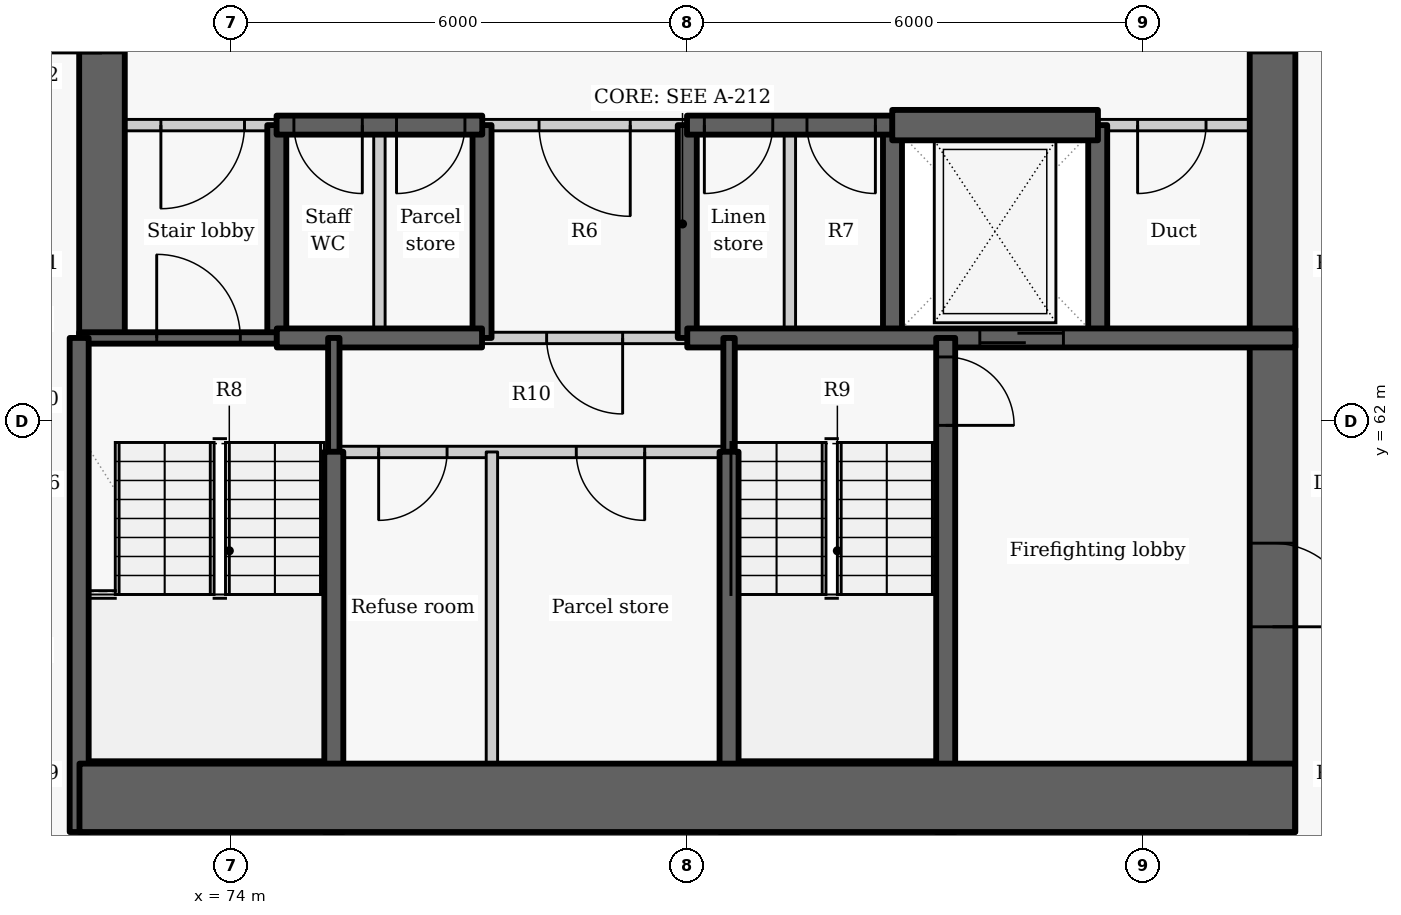
"""IFC4 building model, lengths in metres.
Left out: names, types, materials, properties, quantities, classifications, styles, units other than length and angle.
Written with IfcOpenShell. Run it as: python <this file> out.ifc"""

import sys

from ifc_helpers import new_model, si_unit, direction, frame, frame_2d, origin, place, context, subcontext, project, spatial, rectangle, extrude, element, fill, save


model = new_model("IFC4")
c1 = context("Model", 3, precision=1e-05, world=origin(), true_north=direction((0.0, 1.0)))
c2 = subcontext(c1, "Body", "Model", "MODEL_VIEW")
j1 = project(units=[si_unit("LENGTHUNIT", "METRE"), si_unit("PLANEANGLEUNIT", "RADIAN")], contexts=[c1])
p1 = place(None, origin())
s1 = spatial("IfcSite", under=j1, at=p1, CompositionType="ELEMENT")
p2 = place(p1, origin())
s2 = spatial("IfcBuilding", under=s1, at=p2, CompositionType="ELEMENT")
p3 = place(p2, frame((0.0, 0.0, 51.3)))
s3 = spatial("IfcBuildingStorey", under=s2, at=p3, CompositionType="ELEMENT", Elevation=51.3)
p4 = place(p3, frame((74.6, 63.1, -0.275), z_axis=(0.0, 0.0, 1.0), x_axis=(0.0, 1.0, 0.0)))
e1 = element("IfcWall", 1, at=p4, inside=s3, PredefinedType="SHEAR", context=c2, shape_type="SweptSolid", body=[
    extrude(rectangle(XDim=2.8, YDim=0.25, at=frame_2d((1.4, 0.0))), origin(), (0.0, 0.0, 1.0), 3.3),
])
p5 = place(p3, frame((72.3, 63.1, -0.275), z_axis=(0.0, 0.0, 1.0), x_axis=(0.0, 1.0, 0.0)))
e2 = element("IfcWall", 2, at=p5, inside=s3, PredefinedType="SHEAR", context=c2, shape_type="SweptSolid", body=[
    extrude(rectangle(XDim=9.1, YDim=0.6, at=frame_2d((4.55, 0.0))), origin(), (0.0, 0.0, 1.0), 3.3),
])
p6 = place(p5, frame((3.75, 0.0, 0.275)))
e3 = element("IfcOpeningElement", 3, at=p6, cuts=e2, PredefinedType="OPENING", context=c2, shape_type="SweptSolid", body=[
    extrude(rectangle(XDim=1.5, YDim=2.1, at=frame_2d((0.75, 1.05))), frame((0.0, 0.31, 0.0), z_axis=(0.0, -1.0, 0.0), x_axis=(1.0, 0.0, 0.0)), (0.0, 0.0, 1.0), 0.62),
])
for number, where, z_axis, x_axis in (
    (4, (77.3, 63.1, -0.275), (0.0, 0.0, 1.0), (0.0, 1.0, 0.0)),
    (5, (80.0, 63.1, -0.275), (0.0, 0.0, 1.0), (0.0, 1.0, 0.0)),
    (6, (82.7, 63.1, -0.275), (0.0, 0.0, 1.0), (0.0, 1.0, 0.0)),
    (7, (85.4, 63.1, -0.275), (0.0, 0.0, 1.0), (0.0, 1.0, 0.0)),
):
    element("IfcWall", number, at=place(p3, frame(where, z_axis=z_axis, x_axis=x_axis)), inside=s3, PredefinedType="SHEAR", context=c2, shape_type="SweptSolid", body=[
        extrude(rectangle(XDim=2.8, YDim=0.25, at=frame_2d((1.4, 0.0))), origin(), (0.0, 0.0, 1.0), 3.3),
    ])
p7 = place(p3, frame((87.7, 72.2, -0.275), z_axis=(0.0, 0.0, 1.0), x_axis=(0.0, -1.0, 0.0)))
e8 = element("IfcWall", 8, at=p7, inside=s3, PredefinedType="SHEAR", context=c2, shape_type="SweptSolid", body=[
    extrude(rectangle(XDim=15.6, YDim=0.6, at=frame_2d((7.8, 0.0))), origin(), (0.0, 0.0, 1.0), 3.3),
])
p8 = place(p7, frame((3.85, 0.0, 0.275)))
e9 = element("IfcOpeningElement", 9, at=p8, cuts=e8, PredefinedType="OPENING", context=c2, shape_type="SweptSolid", body=[
    extrude(rectangle(XDim=1.5, YDim=2.1, at=frame_2d((0.75, 1.05))), frame((0.0, 0.31, 0.0), z_axis=(0.0, -1.0, 0.0), x_axis=(1.0, 0.0, 0.0)), (0.0, 0.0, 1.0), 0.62),
])
p9 = place(p7, frame((11.8, 0.0, 0.275)))
e10 = element("IfcOpeningElement", 10, at=p9, cuts=e8, PredefinedType="OPENING", context=c2, shape_type="SweptSolid", body=[
    extrude(rectangle(XDim=1.1, YDim=2.1, at=frame_2d((0.55, 1.05))), frame((0.0, 0.31, 0.0), z_axis=(0.0, -1.0, 0.0), x_axis=(1.0, 0.0, 0.0)), (0.0, 0.0, 1.0), 0.62),
])
p10 = place(p3, frame((74.603, 65.9, 0.0), z_axis=(0.0, 0.0, 1.0), x_axis=(-1.0, 0.0, 0.0)))
e11 = element("IfcWall", 11, at=p10, inside=s3, PredefinedType="PARTITIONING", context=c2, shape_type="SweptSolid", body=[
    extrude(rectangle(XDim=2.603, YDim=0.15, at=frame_2d((1.302, 0.0))), origin(), (0.0, 0.0, 1.0), 3.025),
])
p11 = place(p10, frame((0.428, 0.0, 0.0)))
e12 = element("IfcOpeningElement", 12, at=p11, cuts=e11, PredefinedType="OPENING", context=c2, shape_type="SweptSolid", body=[
    extrude(rectangle(XDim=1.1, YDim=2.1, at=frame_2d((0.55, 1.05))), frame((0.0, 0.085, 0.0), z_axis=(0.0, -1.0, 0.0), x_axis=(1.0, 0.0, 0.0)), (0.0, 0.0, 1.0), 0.17),
])
p12 = place(p3, frame((80.003, 65.9, 0.0), z_axis=(0.0, 0.0, 1.0), x_axis=(-1.0, 0.0, 0.0)))
e13 = element("IfcWall", 13, at=p12, inside=s3, PredefinedType="PARTITIONING", context=c2, shape_type="SweptSolid", body=[
    extrude(rectangle(XDim=2.706, YDim=0.15, at=frame_2d((1.353, 0.0))), origin(), (0.0, 0.0, 1.0), 3.025),
])
p13 = place(p12, frame((0.753, 0.0, 0.0)))
e14 = element("IfcOpeningElement", 14, at=p13, cuts=e13, PredefinedType="OPENING", context=c2, shape_type="SweptSolid", body=[
    extrude(rectangle(XDim=1.2, YDim=2.1, at=frame_2d((0.6, 1.05))), frame((0.0, 0.085, 0.0), z_axis=(0.0, -1.0, 0.0), x_axis=(1.0, 0.0, 0.0)), (0.0, 0.0, 1.0), 0.17),
])
p14 = place(p3, frame((88.0, 65.9, 0.0), z_axis=(0.0, 0.0, 1.0), x_axis=(-1.0, 0.0, 0.0)))
e15 = element("IfcWall", 15, at=p14, inside=s3, PredefinedType="PARTITIONING", context=c2, shape_type="SweptSolid", body=[
    extrude(rectangle(XDim=2.603, YDim=0.15, at=frame_2d((1.302, 0.0))), origin(), (0.0, 0.0, 1.0), 3.025),
])
p15 = place(p14, frame((1.175, 0.0, 0.0)))
e16 = element("IfcOpeningElement", 16, at=p15, cuts=e15, PredefinedType="OPENING", context=c2, shape_type="SweptSolid", body=[
    extrude(rectangle(XDim=0.9, YDim=2.1, at=frame_2d((0.45, 1.05))), frame((0.0, 0.085, 0.0), z_axis=(0.0, -1.0, 0.0), x_axis=(1.0, 0.0, 0.0)), (0.0, 0.0, 1.0), 0.17),
])
p16 = place(p3, frame((77.303, 65.9, -0.275), z_axis=(0.0, 0.0, 1.0), x_axis=(-1.0, 0.0, 0.0)))
e17 = element("IfcWall", 17, at=p16, inside=s3, PredefinedType="SHEAR", context=c2, shape_type="SweptSolid", body=[
    extrude(rectangle(XDim=2.706, YDim=0.25, at=frame_2d((1.353, 0.0))), origin(), (0.0, 0.0, 1.0), 3.3),
])
p17 = place(p16, frame((1.578, 0.0, 0.275)))
e18 = element("IfcOpeningElement", 18, at=p17, cuts=e17, PredefinedType="OPENING", context=c2, shape_type="SweptSolid", body=[
    extrude(rectangle(XDim=0.9, YDim=2.1, at=frame_2d((0.45, 1.05))), frame((0.0, 0.135, 0.0), z_axis=(0.0, -1.0, 0.0), x_axis=(1.0, 0.0, 0.0)), (0.0, 0.0, 1.0), 0.27),
])
p18 = place(p16, frame((0.228, 0.0, 0.275)))
e19 = element("IfcOpeningElement", 19, at=p18, cuts=e17, PredefinedType="OPENING", context=c2, shape_type="SweptSolid", body=[
    extrude(rectangle(XDim=0.9, YDim=2.1, at=frame_2d((0.45, 1.05))), frame((0.0, 0.135, 0.0), z_axis=(0.0, -1.0, 0.0), x_axis=(1.0, 0.0, 0.0)), (0.0, 0.0, 1.0), 0.27),
])
p19 = place(p3, frame((82.703, 65.9, -0.275), z_axis=(0.0, 0.0, 1.0), x_axis=(-1.0, 0.0, 0.0)))
e20 = element("IfcWall", 20, at=p19, inside=s3, PredefinedType="SHEAR", context=c2, shape_type="SweptSolid", body=[
    extrude(rectangle(XDim=2.706, YDim=0.25, at=frame_2d((1.353, 0.0))), origin(), (0.0, 0.0, 1.0), 3.3),
])
p20 = place(p19, frame((1.578, 0.0, 0.275)))
e21 = element("IfcOpeningElement", 21, at=p20, cuts=e20, PredefinedType="OPENING", context=c2, shape_type="SweptSolid", body=[
    extrude(rectangle(XDim=0.9, YDim=2.1, at=frame_2d((0.45, 1.05))), frame((0.0, 0.135, 0.0), z_axis=(0.0, -1.0, 0.0), x_axis=(1.0, 0.0, 0.0)), (0.0, 0.0, 1.0), 0.27),
])
p21 = place(p19, frame((0.228, 0.0, 0.275)))
e22 = element("IfcOpeningElement", 22, at=p21, cuts=e20, PredefinedType="OPENING", context=c2, shape_type="SweptSolid", body=[
    extrude(rectangle(XDim=0.9, YDim=2.1, at=frame_2d((0.45, 1.05))), frame((0.0, 0.135, 0.0), z_axis=(0.0, -1.0, 0.0), x_axis=(1.0, 0.0, 0.0)), (0.0, 0.0, 1.0), 0.27),
])
p22 = place(p3, frame((82.697, 65.9, -0.275), z_axis=(0.0, 0.0, 1.0), x_axis=(1.0, 0.0, 0.0)))
e23 = element("IfcWall", 23, at=p22, inside=s3, PredefinedType="SHEAR", context=c2, shape_type="SweptSolid", body=[
    extrude(rectangle(XDim=2.706, YDim=0.4, at=frame_2d((1.353, 0.0))), origin(), (0.0, 0.0, 1.0), 3.3),
])
p23 = place(p3, frame((72.0, 63.1, -0.275), z_axis=(0.0, 0.0, 1.0), x_axis=(1.0, 0.0, 0.0)))
e24 = element("IfcWall", 24, at=p23, inside=s3, PredefinedType="SHEAR", context=c2, shape_type="SweptSolid", body=[
    extrude(rectangle(XDim=2.6, YDim=0.15, at=frame_2d((1.3, 0.0))), origin(), (0.0, 0.0, 1.0), 3.3),
])
p24 = place(p23, frame((1.02, 0.0, 0.275)))
e25 = element("IfcOpeningElement", 25, at=p24, cuts=e24, PredefinedType="OPENING", context=c2, shape_type="SweptSolid", body=[
    extrude(rectangle(XDim=1.1, YDim=2.1, at=frame_2d((0.55, 1.05))), frame((0.0, 0.085, 0.0), z_axis=(0.0, -1.0, 0.0), x_axis=(1.0, 0.0, 0.0)), (0.0, 0.0, 1.0), 0.17),
])
p25 = place(p3, frame((75.95, 63.1, 0.0), z_axis=(0.0, 0.0, 1.0), x_axis=(0.0, 1.0, 0.0)))
e26 = element("IfcWall", 26, at=p25, inside=s3, PredefinedType="PARTITIONING", context=c2, shape_type="SweptSolid", body=[
    extrude(rectangle(XDim=2.8, YDim=0.15, at=frame_2d((1.4, 0.0))), origin(), (0.0, 0.0, 1.0), 3.025),
])
p26 = place(p3, frame((74.6, 63.1, -0.275), z_axis=(0.0, 0.0, 1.0), x_axis=(1.0, 0.0, 0.0)))
e27 = element("IfcWall", 27, at=p26, inside=s3, PredefinedType="SHEAR", context=c2, shape_type="SweptSolid", body=[
    extrude(rectangle(XDim=2.7, YDim=0.25, at=frame_2d((1.35, 0.0))), origin(), (0.0, 0.0, 1.0), 3.3),
])
p27 = place(p3, frame((80.0, 63.1, -0.275), z_axis=(0.0, 0.0, 1.0), x_axis=(1.0, 0.0, 0.0)))
e28 = element("IfcWall", 28, at=p27, inside=s3, PredefinedType="SHEAR", context=c2, shape_type="SweptSolid", body=[
    extrude(rectangle(XDim=8.0, YDim=0.25, at=frame_2d((4.0, 0.0))), origin(), (0.0, 0.0, 1.0), 3.3),
])
p28 = place(p27, frame((3.849, 0.0, 0.275)))
e29 = element("IfcOpeningElement", 29, at=p28, cuts=e28, PredefinedType="OPENING", context=c2, shape_type="SweptSolid", body=[
    extrude(rectangle(XDim=1.1, YDim=2.1, at=frame_2d((0.55, 1.05))), frame((0.0, 0.135, 0.0), z_axis=(0.0, -1.0, 0.0), x_axis=(1.0, 0.0, 0.0)), (0.0, 0.0, 1.0), 0.27),
])
p29 = place(p3, frame((80.0, 63.1, 0.0), z_axis=(0.0, 0.0, 1.0), x_axis=(-1.0, 0.0, 0.0)))
e30 = element("IfcWall", 30, at=p29, inside=s3, PredefinedType="PARTITIONING", context=c2, shape_type="SweptSolid", body=[
    extrude(rectangle(XDim=2.7, YDim=0.15, at=frame_2d((1.35, 0.0))), origin(), (0.0, 0.0, 1.0), 3.025),
])
p30 = place(p29, frame((0.85, 0.0, 0.0)))
e31 = element("IfcOpeningElement", 31, at=p30, cuts=e30, PredefinedType="OPENING", context=c2, shape_type="SweptSolid", body=[
    extrude(rectangle(XDim=1.0, YDim=2.1, at=frame_2d((0.5, 1.05))), frame((0.0, 0.085, 0.0), z_axis=(0.0, -1.0, 0.0), x_axis=(1.0, 0.0, 0.0)), (0.0, 0.0, 1.0), 0.17),
])
p31 = place(p3, frame((81.35, 63.1, 0.0), z_axis=(0.0, 0.0, 1.0), x_axis=(0.0, 1.0, 0.0)))
e32 = element("IfcWall", 32, at=p31, inside=s3, PredefinedType="PARTITIONING", context=c2, shape_type="SweptSolid", body=[
    extrude(rectangle(XDim=2.8, YDim=0.15, at=frame_2d((1.4, 0.0))), origin(), (0.0, 0.0, 1.0), 3.025),
])
p32 = place(p3, frame((75.35, 61.597, -0.275), z_axis=(0.0, 0.0, 1.0), x_axis=(0.0, 1.0, 0.0)))
e33 = element("IfcWall", 33, at=p32, inside=s3, PredefinedType="SHEAR", context=c2, shape_type="SweptSolid", body=[
    extrude(rectangle(XDim=1.503, YDim=0.15, at=frame_2d((0.751, 0.0))), origin(), (0.0, 0.0, 1.0), 3.3),
])
p33 = place(p3, frame((75.35, 56.6, -0.275), z_axis=(0.0, 0.0, 1.0), x_axis=(0.0, 1.0, 0.0)))
e34 = element("IfcWall", 34, at=p33, inside=s3, PredefinedType="SHEAR", context=c2, shape_type="SweptSolid", body=[
    extrude(rectangle(XDim=5.003, YDim=0.25, at=frame_2d((2.501, 0.0))), origin(), (0.0, 0.0, 1.0), 3.3),
])
p34 = place(p3, frame((72.0, 56.6, -0.275), z_axis=(0.0, 0.0, 1.0), x_axis=(0.0, 1.0, 0.0)))
e35 = element("IfcWall", 35, at=p34, inside=s3, PredefinedType="SHEAR", context=c2, shape_type="SweptSolid", body=[
    extrude(rectangle(XDim=6.5, YDim=0.25, at=frame_2d((3.25, 0.0))), origin(), (0.0, 0.0, 1.0), 3.3),
])
p35 = place(p3, frame((83.4, 63.1, -0.275), z_axis=(0.0, 0.0, 1.0), x_axis=(0.0, -1.0, 0.0)))
e36 = element("IfcWall", 36, at=p35, inside=s3, PredefinedType="SHEAR", context=c2, shape_type="SweptSolid", body=[
    extrude(rectangle(XDim=6.5, YDim=0.25, at=frame_2d((3.25, 0.0))), origin(), (0.0, 0.0, 1.0), 3.3),
])
p36 = place(p35, frame((0.25, 0.0, 0.275)))
e37 = element("IfcOpeningElement", 37, at=p36, cuts=e36, PredefinedType="OPENING", context=c2, shape_type="SweptSolid", body=[
    extrude(rectangle(XDim=0.9, YDim=2.1, at=frame_2d((0.45, 1.05))), frame((0.0, 0.135, 0.0), z_axis=(0.0, -1.0, 0.0), x_axis=(1.0, 0.0, 0.0)), (0.0, 0.0, 1.0), 0.27),
])
p37 = place(p3, frame((80.55, 61.597, -0.275), z_axis=(0.0, 0.0, 1.0), x_axis=(0.0, 1.0, 0.0)))
e38 = element("IfcWall", 38, at=p37, inside=s3, PredefinedType="SHEAR", context=c2, shape_type="SweptSolid", body=[
    extrude(rectangle(XDim=1.503, YDim=0.15, at=frame_2d((0.751, 0.0))), origin(), (0.0, 0.0, 1.0), 3.3),
])
p38 = place(p3, frame((80.55, 56.6, -0.275), z_axis=(0.0, 0.0, 1.0), x_axis=(0.0, 1.0, 0.0)))
e39 = element("IfcWall", 39, at=p38, inside=s3, PredefinedType="SHEAR", context=c2, shape_type="SweptSolid", body=[
    extrude(rectangle(XDim=5.003, YDim=0.25, at=frame_2d((2.501, 0.0))), origin(), (0.0, 0.0, 1.0), 3.3),
])
p39 = place(p3, frame((80.55, 61.6, 0.0), z_axis=(0.0, 0.0, 1.0), x_axis=(-1.0, 0.0, 0.0)))
e40 = element("IfcWall", 40, at=p39, inside=s3, PredefinedType="PARTITIONING", context=c2, shape_type="SweptSolid", body=[
    extrude(rectangle(XDim=5.2, YDim=0.15, at=frame_2d((2.6, 0.0))), origin(), (0.0, 0.0, 1.0), 3.025),
])
p40 = place(p39, frame((3.71, 0.0, 0.0)))
e41 = element("IfcOpeningElement", 41, at=p40, cuts=e40, PredefinedType="OPENING", context=c2, shape_type="SweptSolid", body=[
    extrude(rectangle(XDim=0.9, YDim=2.1, at=frame_2d((0.45, 1.05))), frame((0.0, 0.085, 0.0), z_axis=(0.0, -1.0, 0.0), x_axis=(1.0, 0.0, 0.0)), (0.0, 0.0, 1.0), 0.17),
])
p41 = place(p39, frame((1.11, 0.0, 0.0)))
e42 = element("IfcOpeningElement", 42, at=p41, cuts=e40, PredefinedType="OPENING", context=c2, shape_type="SweptSolid", body=[
    extrude(rectangle(XDim=0.9, YDim=2.1, at=frame_2d((0.45, 1.05))), frame((0.0, 0.085, 0.0), z_axis=(0.0, -1.0, 0.0), x_axis=(1.0, 0.0, 0.0)), (0.0, 0.0, 1.0), 0.17),
])
p42 = place(p3, frame((77.43, 56.6, 0.0), z_axis=(0.0, 0.0, 1.0), x_axis=(0.0, 1.0, 0.0)))
e43 = element("IfcWall", 43, at=p42, inside=s3, PredefinedType="PARTITIONING", context=c2, shape_type="SweptSolid", body=[
    extrude(rectangle(XDim=5.0, YDim=0.15, at=frame_2d((2.5, 0.0))), origin(), (0.0, 0.0, 1.0), 3.025),
])
p43 = place(p3, frame((72.004, 57.05, -0.275), z_axis=(0.0, 0.0, 1.0), x_axis=(1.0, 0.0, 0.0)))
e44 = element("IfcWall", 44, at=p43, inside=s3, PredefinedType="SHEAR", context=c2, shape_type="SweptSolid", body=[
    extrude(rectangle(XDim=15.992, YDim=0.9, at=frame_2d((7.996, 0.0))), origin(), (0.0, 0.0, 1.0), 3.3),
])
p44 = place(p11, origin())
e45 = element("IfcDoor", 45, at=p44, inside=s3, OperationType="SINGLE_SWING_RIGHT", PredefinedType="DOOR", context=c2, shape_type="SweptSolid", body=[
    extrude(rectangle(XDim=1.1, YDim=2.1, at=frame_2d((0.55, 1.05))), frame((0.0, 0.025, 0.0), z_axis=(0.0, -1.0, 0.0), x_axis=(1.0, 0.0, 0.0)), (0.0, 0.0, 1.0), 0.05),
])
fill(e12, e45)
p45 = place(p17, origin())
e46 = element("IfcDoor", 46, at=p45, inside=s3, OperationType="SINGLE_SWING_LEFT", PredefinedType="DOOR", context=c2, shape_type="SweptSolid", body=[
    extrude(rectangle(XDim=0.9, YDim=2.1, at=frame_2d((0.45, 1.05))), frame((0.0, 0.025, 0.0), z_axis=(0.0, -1.0, 0.0), x_axis=(1.0, 0.0, 0.0)), (0.0, 0.0, 1.0), 0.05),
])
fill(e18, e46)
p46 = place(p18, origin())
e47 = element("IfcDoor", 47, at=p46, inside=s3, OperationType="SINGLE_SWING_RIGHT", PredefinedType="DOOR", context=c2, shape_type="SweptSolid", body=[
    extrude(rectangle(XDim=0.9, YDim=2.1, at=frame_2d((0.45, 1.05))), frame((0.0, 0.025, 0.0), z_axis=(0.0, -1.0, 0.0), x_axis=(1.0, 0.0, 0.0)), (0.0, 0.0, 1.0), 0.05),
])
fill(e19, e47)
p47 = place(p13, origin())
e48 = element("IfcDoor", 48, at=p47, inside=s3, OperationType="DOUBLE_DOOR_SINGLE_SWING", PredefinedType="DOOR", context=c2, shape_type="SweptSolid", body=[
    extrude(rectangle(XDim=1.2, YDim=2.1, at=frame_2d((0.6, 1.05))), frame((0.0, 0.025, 0.0), z_axis=(0.0, -1.0, 0.0), x_axis=(1.0, 0.0, 0.0)), (0.0, 0.0, 1.0), 0.05),
])
fill(e14, e48)
p48 = place(p20, origin())
e49 = element("IfcDoor", 49, at=p48, inside=s3, OperationType="SINGLE_SWING_RIGHT", PredefinedType="DOOR", context=c2, shape_type="SweptSolid", body=[
    extrude(rectangle(XDim=0.9, YDim=2.1, at=frame_2d((0.45, 1.05))), frame((0.0, 0.025, 0.0), z_axis=(0.0, -1.0, 0.0), x_axis=(1.0, 0.0, 0.0)), (0.0, 0.0, 1.0), 0.05),
])
fill(e21, e49)
p49 = place(p21, origin())
e50 = element("IfcDoor", 50, at=p49, inside=s3, OperationType="SINGLE_SWING_LEFT", PredefinedType="DOOR", context=c2, shape_type="SweptSolid", body=[
    extrude(rectangle(XDim=0.9, YDim=2.1, at=frame_2d((0.45, 1.05))), frame((0.0, 0.025, 0.0), z_axis=(0.0, -1.0, 0.0), x_axis=(1.0, 0.0, 0.0)), (0.0, 0.0, 1.0), 0.05),
])
fill(e22, e50)
p50 = place(p28, origin())
e51 = element("IfcDoor", 51, at=p50, inside=s3, OperationType="SLIDING_TO_LEFT", PredefinedType="DOOR", context=c2, shape_type="SweptSolid", body=[
    extrude(rectangle(XDim=1.1, YDim=2.1, at=frame_2d((0.55, 1.05))), frame((0.0, 0.025, 0.0), z_axis=(0.0, -1.0, 0.0), x_axis=(1.0, 0.0, 0.0)), (0.0, 0.0, 1.0), 0.05),
])
fill(e29, e51)
p51 = place(p15, origin())
e52 = element("IfcDoor", 52, at=p51, inside=s3, OperationType="SINGLE_SWING_RIGHT", PredefinedType="DOOR", context=c2, shape_type="SweptSolid", body=[
    extrude(rectangle(XDim=0.9, YDim=2.1, at=frame_2d((0.45, 1.05))), frame((0.0, 0.025, 0.0), z_axis=(0.0, -1.0, 0.0), x_axis=(1.0, 0.0, 0.0)), (0.0, 0.0, 1.0), 0.05),
])
fill(e16, e52)
p52 = place(p30, origin())
e53 = element("IfcDoor", 53, at=p52, inside=s3, OperationType="SINGLE_SWING_LEFT", PredefinedType="DOOR", context=c2, shape_type="SweptSolid", body=[
    extrude(rectangle(XDim=1.0, YDim=2.1, at=frame_2d((0.5, 1.05))), frame((0.0, 0.025, 0.0), z_axis=(0.0, -1.0, 0.0), x_axis=(1.0, 0.0, 0.0)), (0.0, 0.0, 1.0), 0.05),
])
fill(e31, e53)
p53 = place(p40, origin())
e54 = element("IfcDoor", 54, at=p53, inside=s3, OperationType="SINGLE_SWING_RIGHT", PredefinedType="DOOR", context=c2, shape_type="SweptSolid", body=[
    extrude(rectangle(XDim=0.9, YDim=2.1, at=frame_2d((0.45, 1.05))), frame((0.0, 0.025, 0.0), z_axis=(0.0, -1.0, 0.0), x_axis=(1.0, 0.0, 0.0)), (0.0, 0.0, 1.0), 0.05),
])
fill(e41, e54)
p54 = place(p41, origin())
e55 = element("IfcDoor", 55, at=p54, inside=s3, OperationType="SINGLE_SWING_LEFT", PredefinedType="DOOR", context=c2, shape_type="SweptSolid", body=[
    extrude(rectangle(XDim=0.9, YDim=2.1, at=frame_2d((0.45, 1.05))), frame((0.0, 0.025, 0.0), z_axis=(0.0, -1.0, 0.0), x_axis=(1.0, 0.0, 0.0)), (0.0, 0.0, 1.0), 0.05),
])
fill(e42, e55)
p55 = place(p24, origin())
e56 = element("IfcDoor", 56, at=p55, inside=s3, OperationType="SINGLE_SWING_LEFT", PredefinedType="DOOR", context=c2, shape_type="SweptSolid", body=[
    extrude(rectangle(XDim=1.1, YDim=2.1, at=frame_2d((0.55, 1.05))), frame((0.0, 0.025, 0.0), z_axis=(0.0, -1.0, 0.0), x_axis=(1.0, 0.0, 0.0)), (0.0, 0.0, 1.0), 0.05),
])
fill(e25, e56)
p56 = place(p36, origin())
e57 = element("IfcDoor", 57, at=p56, inside=s3, OperationType="SINGLE_SWING_RIGHT", PredefinedType="DOOR", context=c2, shape_type="SweptSolid", body=[
    extrude(rectangle(XDim=0.9, YDim=2.1, at=frame_2d((0.45, 1.05))), frame((0.0, 0.025, 0.0), z_axis=(0.0, -1.0, 0.0), x_axis=(1.0, 0.0, 0.0)), (0.0, 0.0, 1.0), 0.05),
])
fill(e37, e57)
p57 = place(p8, origin())
e58 = element("IfcDoor", 58, at=p57, inside=s3, OperationType="DOUBLE_DOOR_SINGLE_SWING", PredefinedType="DOOR", context=c2, shape_type="SweptSolid", body=[
    extrude(rectangle(XDim=1.5, YDim=2.1, at=frame_2d((0.75, 1.05))), frame((0.0, 0.025, 0.0), z_axis=(0.0, -1.0, 0.0), x_axis=(1.0, 0.0, 0.0)), (0.0, 0.0, 1.0), 0.05),
])
fill(e9, e58)
p58 = place(p9, origin())
e59 = element("IfcDoor", 59, at=p58, inside=s3, OperationType="SINGLE_SWING_RIGHT", PredefinedType="DOOR", context=c2, shape_type="SweptSolid", body=[
    extrude(rectangle(XDim=1.1, YDim=2.1, at=frame_2d((0.55, 1.05))), frame((0.0, 0.025, 0.0), z_axis=(0.0, -1.0, 0.0), x_axis=(1.0, 0.0, 0.0)), (0.0, 0.0, 1.0), 0.05),
])
fill(e10, e59)
save(model, sys.argv[1])
